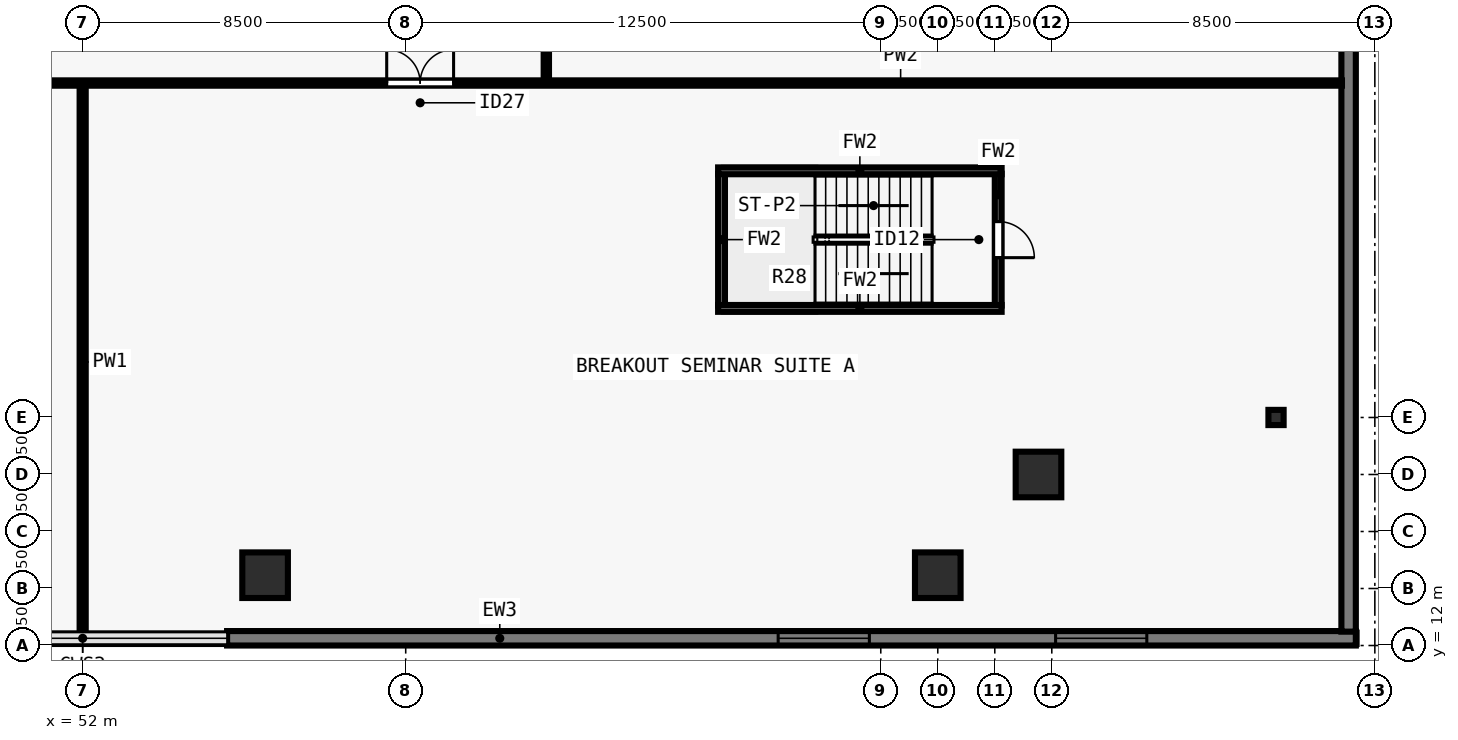
"""IFC4 building model, lengths in metres.
Left out: names, types, materials, properties, quantities, classifications, styles, units other than length and angle.
Written with IfcOpenShell. Run it as: python <this file> out.ifc"""

import sys

from ifc_helpers import new_model, si_unit, direction, frame, frame_2d, origin, origin_2d, place, context, subcontext, project, spatial, rectangle, i_section, extrude, element, fill, save


model = new_model("IFC4")
c1 = context("Model", 3, precision=1e-05, world=origin(), true_north=direction((0.0, 1.0)))
c2 = subcontext(c1, "Body", "Model", "MODEL_VIEW")
j1 = project(units=[si_unit("LENGTHUNIT", "METRE"), si_unit("PLANEANGLEUNIT", "RADIAN")], contexts=[c1])
p1 = place(None, origin())
s1 = spatial("IfcSite", under=j1, at=p1, CompositionType="ELEMENT")
p2 = place(p1, origin())
s2 = spatial("IfcBuilding", under=s1, at=p2, CompositionType="ELEMENT")
p3 = place(p2, frame((0.0, 0.0, 14.5)))
s3 = spatial("IfcBuildingStorey", under=s2, at=p3, CompositionType="ELEMENT", Elevation=14.5)
for number, where, z_axis, x_axis in (
    (1, (56.8, 13.85, 0.0), (0.0, 0.0, 1.0), (1.0, 0.0, 0.0)),
    (2, (74.5, 13.85, 0.0), (0.0, 0.0, 1.0), (1.0, 0.0, 0.0)),
    (3, (77.15, 16.5, 0.0), (0.0, 0.0, 1.0), (1.0, 0.0, 0.0)),
):
    element("IfcColumn", number, at=place(p3, frame(where, z_axis=z_axis, x_axis=x_axis)), inside=s3, PredefinedType="COLUMN", context=c2, shape_type="SweptSolid", body=[
        extrude(rectangle(XDim=1.2, YDim=1.2, at=origin_2d()), origin(), (0.0, 0.0, 1.0), 4.5),
    ])
p4 = place(p3, frame((83.4, 18.0, 0.0), z_axis=(0.0, 0.0, 1.0), x_axis=(1.0, 0.0, 0.0)))
e4 = element("IfcColumn", 4, at=p4, inside=s3, PredefinedType="COLUMN", context=c2, shape_type="SweptSolid", body=[
    extrude(i_section(OverallWidth=0.4, OverallDepth=0.4, WebThickness=0.028, FlangeThickness=0.045, at=origin_2d()), origin(), (0.0, 0.0, 1.0), 4.5),
])
p5 = place(p3, frame((85.5, 12.19, 0.0), z_axis=(0.0, 0.0, 1.0), x_axis=(-1.0, 0.0, 0.0)))
e5 = element("IfcWall", 5, at=p5, inside=s3, PredefinedType="SOLIDWALL", context=c2, shape_type="SweptSolid", body=[
    extrude(rectangle(XDim=29.7, YDim=0.38, at=frame_2d((14.85, 0.0))), origin(), (0.0, 0.0, 1.0), 4.15),
])
p6 = place(p5, frame((5.5, 0.0, 0.8)))
e6 = element("IfcOpeningElement", 6, at=p6, cuts=e5, PredefinedType="OPENING", context=c2, shape_type="SweptSolid", body=[
    extrude(rectangle(XDim=2.4, YDim=1.6, at=frame_2d((1.2, 0.8))), frame((0.0, 0.2, 0.0), z_axis=(0.0, -1.0, 0.0), x_axis=(1.0, 0.0, 0.0)), (0.0, 0.0, 1.0), 0.4),
])
p7 = place(p5, frame((12.8, 0.0, 0.8)))
e7 = element("IfcOpeningElement", 7, at=p7, cuts=e5, PredefinedType="OPENING", context=c2, shape_type="SweptSolid", body=[
    extrude(rectangle(XDim=2.4, YDim=1.6, at=frame_2d((1.2, 0.8))), frame((0.0, 0.2, 0.0), z_axis=(0.0, -1.0, 0.0), x_axis=(1.0, 0.0, 0.0)), (0.0, 0.0, 1.0), 0.4),
])
p8 = place(p3, frame((85.31, 65.635, 0.0), z_axis=(0.0, 0.0, 1.0), x_axis=(0.0, -1.0, 0.0)))
e8 = element("IfcWall", 8, at=p8, inside=s3, PredefinedType="SOLIDWALL", context=c2, shape_type="SweptSolid", body=[
    extrude(rectangle(XDim=53.27, YDim=0.38, at=frame_2d((26.635, 0.0))), origin(), (0.0, 0.0, 1.0), 4.15),
])
p9 = place(p3, frame((18.865, 26.8, 0.0), z_axis=(0.0, 0.0, 1.0), x_axis=(1.0, 0.0, 0.0)))
e9 = element("IfcWall", 9, at=p9, inside=s3, PredefinedType="PARTITIONING", context=c2, shape_type="SweptSolid", body=[
    extrude(rectangle(XDim=66.27, YDim=0.14, at=frame_2d((33.135, 0.0))), origin(), (0.0, 0.0, 1.0), 3.668),
])
p10 = place(p9, frame((18.915, 0.0, 0.0)))
e10 = element("IfcOpeningElement", 10, at=p10, cuts=e9, PredefinedType="OPENING", context=c2, shape_type="SweptSolid", body=[
    extrude(rectangle(XDim=1.76, YDim=2.2, at=frame_2d((0.88, 1.1))), frame((0.0, 0.08, 0.0), z_axis=(0.0, -1.0, 0.0), x_axis=(1.0, 0.0, 0.0)), (0.0, 0.0, 1.0), 0.16),
])
p11 = place(p9, frame((41.135, 0.0, 0.0)))
e11 = element("IfcOpeningElement", 11, at=p11, cuts=e9, PredefinedType="OPENING", context=c2, shape_type="SweptSolid", body=[
    extrude(rectangle(XDim=1.76, YDim=2.2, at=frame_2d((0.88, 1.1))), frame((0.0, 0.08, 0.0), z_axis=(0.0, -1.0, 0.0), x_axis=(1.0, 0.0, 0.0)), (0.0, 0.0, 1.0), 0.16),
])
p12 = place(p3, frame((64.2, 26.855, 0.0), z_axis=(0.0, 0.0, 1.0), x_axis=(0.0, 1.0, 0.0)))
e12 = element("IfcWall", 12, at=p12, inside=s3, PredefinedType="PARTITIONING", context=c2, shape_type="SweptSolid", body=[
    extrude(rectangle(XDim=24.29, YDim=0.14, at=frame_2d((12.145, 0.0))), origin(), (0.0, 0.0, 1.0), 4.15),
])
p13 = place(p12, frame((10.945, 0.0, 0.0)))
e13 = element("IfcOpeningElement", 13, at=p13, cuts=e12, PredefinedType="OPENING", context=c2, shape_type="SweptSolid", body=[
    extrude(rectangle(XDim=1.76, YDim=2.2, at=frame_2d((0.88, 1.1))), frame((0.0, 0.08, 0.0), z_axis=(0.0, -1.0, 0.0), x_axis=(1.0, 0.0, 0.0)), (0.0, 0.0, 1.0), 0.16),
])
p14 = place(p3, frame((52.0, 12.22, 0.0), z_axis=(0.0, 0.0, 1.0), x_axis=(0.0, 1.0, 0.0)))
e14 = element("IfcWall", 14, at=p14, inside=s3, PredefinedType="PARTITIONING", context=c2, shape_type="SweptSolid", body=[
    extrude(rectangle(XDim=14.48, YDim=0.16, at=frame_2d((7.24, 0.0))), origin(), (0.0, 0.0, 1.0), 4.15),
])
p15 = place(p3, frame((76.09, 24.415, 0.0), z_axis=(0.0, 0.0, 1.0), x_axis=(0.0, -1.0, 0.0)))
e15 = element("IfcWall", 15, at=p15, inside=s3, PredefinedType="SOLIDWALL", context=c2, shape_type="SweptSolid", body=[
    extrude(rectangle(XDim=3.47, YDim=0.18, at=frame_2d((1.735, 0.0))), origin(), (0.0, 0.0, 1.0), 4.15),
])
p16 = place(p15, frame((1.26, 0.0, 0.0)))
e16 = element("IfcOpeningElement", 16, at=p16, cuts=e15, PredefinedType="OPENING", context=c2, shape_type="SweptSolid", body=[
    extrude(rectangle(XDim=0.95, YDim=2.15, at=frame_2d((0.475, 1.075))), frame((0.0, 0.1, 0.0), z_axis=(0.0, -1.0, 0.0), x_axis=(1.0, 0.0, 0.0)), (0.0, 0.0, 1.0), 0.2),
])
p17 = place(p3, frame((68.81, 24.415, 0.0), z_axis=(0.0, 0.0, 1.0), x_axis=(0.0, -1.0, 0.0)))
e17 = element("IfcWall", 17, at=p17, inside=s3, PredefinedType="SOLIDWALL", context=c2, shape_type="SweptSolid", body=[
    extrude(rectangle(XDim=3.47, YDim=0.18, at=frame_2d((1.735, 0.0))), origin(), (0.0, 0.0, 1.0), 4.15),
])
for number, where, z_axis, x_axis in (
    (18, (76.18, 24.49, 0.0), (0.0, 0.0, 1.0), (-1.0, 0.0, 0.0)),
    (19, (76.18, 20.87, 0.0), (0.0, 0.0, 1.0), (-1.0, 0.0, 0.0)),
):
    element("IfcWall", number, at=place(p3, frame(where, z_axis=z_axis, x_axis=x_axis)), inside=s3, PredefinedType="SOLIDWALL", context=c2, shape_type="SweptSolid", body=[
        extrude(rectangle(XDim=7.46, YDim=0.18, at=frame_2d((3.73, 0.0))), origin(), (0.0, 0.0, 1.0), 4.15),
    ])
p18 = place(p6, origin())
e20 = element("IfcWindow", 20, at=p18, inside=s3, PartitioningType="SINGLE_PANEL", PredefinedType="WINDOW", context=c2, shape_type="SweptSolid", body=[
    extrude(rectangle(XDim=2.4, YDim=1.6, at=frame_2d((1.2, 0.8))), frame((0.0, -0.05, 0.0), z_axis=(0.0, -1.0, 0.0), x_axis=(1.0, 0.0, 0.0)), (0.0, 0.0, 1.0), 0.06),
])
fill(e6, e20)
p19 = place(p7, origin())
e21 = element("IfcWindow", 21, at=p19, inside=s3, PartitioningType="SINGLE_PANEL", PredefinedType="WINDOW", context=c2, shape_type="SweptSolid", body=[
    extrude(rectangle(XDim=2.4, YDim=1.6, at=frame_2d((1.2, 0.8))), frame((0.0, -0.05, 0.0), z_axis=(0.0, -1.0, 0.0), x_axis=(1.0, 0.0, 0.0)), (0.0, 0.0, 1.0), 0.06),
])
fill(e7, e21)
p20 = place(p11, origin())
e22 = element("IfcDoor", 22, at=p20, inside=s3, OperationType="DOUBLE_DOOR_SINGLE_SWING", PredefinedType="DOOR", context=c2, shape_type="SweptSolid", body=[
    extrude(rectangle(XDim=1.76, YDim=2.2, at=frame_2d((0.88, 1.1))), frame((0.0, 0.025, 0.0), z_axis=(0.0, -1.0, 0.0), x_axis=(1.0, 0.0, 0.0)), (0.0, 0.0, 1.0), 0.05),
])
fill(e11, e22)
p21 = place(p16, origin())
e23 = element("IfcDoor", 23, at=p21, inside=s3, OperationType="SINGLE_SWING_RIGHT", PredefinedType="DOOR", context=c2, shape_type="SweptSolid", body=[
    extrude(rectangle(XDim=0.95, YDim=2.15, at=frame_2d((0.475, 1.075))), frame((0.0, 0.025, 0.0), z_axis=(0.0, -1.0, 0.0), x_axis=(1.0, 0.0, 0.0)), (0.0, 0.0, 1.0), 0.05),
])
fill(e16, e23)
save(model, sys.argv[1])
